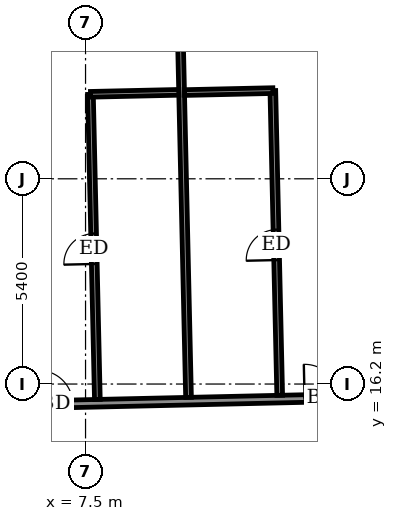
"""IFC4 building model, lengths in metres.
Left out: names, types, materials, properties, quantities, classifications, styles, units other than length and angle.
Written with IfcOpenShell. Run it as: python <this file> out.ifc"""

import sys

from ifc_helpers import new_model, si_unit, direction, frame, frame_2d, origin, place, context, subcontext, project, spatial, rectangle, extrude, element, fill, save


model = new_model("IFC4")
c1 = context("Model", 3, precision=1e-05, world=origin(), true_north=direction((0.0, 1.0)))
c2 = subcontext(c1, "Body", "Model", "MODEL_VIEW")
j1 = project(units=[si_unit("LENGTHUNIT", "METRE"), si_unit("PLANEANGLEUNIT", "RADIAN")], contexts=[c1])
p1 = place(None, origin())
s1 = spatial("IfcSite", under=j1, at=p1, CompositionType="ELEMENT")
p2 = place(p1, origin())
s2 = spatial("IfcBuilding", under=s1, at=p2, CompositionType="ELEMENT")
p3 = place(p2, frame((0.0, 0.0, 279.9)))
s3 = spatial("IfcBuildingStorey", under=s2, at=p3, CompositionType="ELEMENT", Elevation=279.9)
p4 = place(p3, frame((-26.401, 14.918, 0.0), z_axis=(0.0, 0.0, 1.0), x_axis=(0.99974239733, 0.022696673341, 0.0)))
e1 = element("IfcWall", 1, at=p4, inside=s3, PredefinedType="PARTITIONING", context=c2, shape_type="SweptSolid", body=[
    extrude(rectangle(XDim=55.386, YDim=0.2, at=frame_2d((27.693, 0.0))), origin(), (0.0, 0.0, 1.0), 3.05),
])
p5 = place(p4, frame((52.889, 0.0, 0.0)))
e2 = element("IfcOpeningElement", 2, at=p5, cuts=e1, PredefinedType="OPENING", context=c2, shape_type="SweptSolid", body=[
    extrude(rectangle(XDim=1.0, YDim=2.1, at=frame_2d((0.5, 1.05))), frame((0.0, 0.11, 0.0), z_axis=(0.0, -1.0, 0.0), x_axis=(1.0, 0.0, 0.0)), (0.0, 0.0, 1.0), 0.22),
])
p6 = place(p4, frame((48.6, 0.0, 0.0)))
e3 = element("IfcOpeningElement", 3, at=p6, cuts=e1, PredefinedType="OPENING", context=c2, shape_type="SweptSolid", body=[
    extrude(rectangle(XDim=0.9, YDim=2.1, at=frame_2d((0.45, 1.05))), frame((0.0, 0.11, 0.0), z_axis=(0.0, -1.0, 0.0), x_axis=(1.0, 0.0, 0.0)), (0.0, 0.0, 1.0), 0.22),
])
p7 = place(p4, frame((41.8, 0.0, 0.0)))
e4 = element("IfcOpeningElement", 4, at=p7, cuts=e1, PredefinedType="OPENING", context=c2, shape_type="SweptSolid", body=[
    extrude(rectangle(XDim=0.9, YDim=2.1, at=frame_2d((0.45, 1.05))), frame((0.0, 0.11, 0.0), z_axis=(0.0, -1.0, 0.0), x_axis=(1.0, 0.0, 0.0)), (0.0, 0.0, 1.0), 0.22),
])
p8 = place(p4, frame((39.675, 0.0, 0.0)))
e5 = element("IfcOpeningElement", 5, at=p8, cuts=e1, PredefinedType="OPENING", context=c2, shape_type="SweptSolid", body=[
    extrude(rectangle(XDim=0.9, YDim=2.1, at=frame_2d((0.45, 1.05))), frame((0.0, 0.11, 0.0), z_axis=(0.0, -1.0, 0.0), x_axis=(1.0, 0.0, 0.0)), (0.0, 0.0, 1.0), 0.22),
])
p9 = place(p4, frame((32.675, 0.0, 0.0)))
e6 = element("IfcOpeningElement", 6, at=p9, cuts=e1, PredefinedType="OPENING", context=c2, shape_type="SweptSolid", body=[
    extrude(rectangle(XDim=0.9, YDim=2.1, at=frame_2d((0.45, 1.05))), frame((0.0, 0.11, 0.0), z_axis=(0.0, -1.0, 0.0), x_axis=(1.0, 0.0, 0.0)), (0.0, 0.0, 1.0), 0.22),
])
p10 = place(p4, frame((30.4, 0.0, 0.0)))
e7 = element("IfcOpeningElement", 7, at=p10, cuts=e1, PredefinedType="OPENING", context=c2, shape_type="SweptSolid", body=[
    extrude(rectangle(XDim=0.9, YDim=2.1, at=frame_2d((0.45, 1.05))), frame((0.0, 0.11, 0.0), z_axis=(0.0, -1.0, 0.0), x_axis=(1.0, 0.0, 0.0)), (0.0, 0.0, 1.0), 0.22),
])
p11 = place(p4, frame((23.225, 0.0, 0.0)))
e8 = element("IfcOpeningElement", 8, at=p11, cuts=e1, PredefinedType="OPENING", context=c2, shape_type="SweptSolid", body=[
    extrude(rectangle(XDim=0.9, YDim=2.1, at=frame_2d((0.45, 1.05))), frame((0.0, 0.11, 0.0), z_axis=(0.0, -1.0, 0.0), x_axis=(1.0, 0.0, 0.0)), (0.0, 0.0, 1.0), 0.22),
])
p12 = place(p4, frame((20.9, 0.0, 0.0)))
e9 = element("IfcOpeningElement", 9, at=p12, cuts=e1, PredefinedType="OPENING", context=c2, shape_type="SweptSolid", body=[
    extrude(rectangle(XDim=0.9, YDim=2.1, at=frame_2d((0.45, 1.05))), frame((0.0, 0.11, 0.0), z_axis=(0.0, -1.0, 0.0), x_axis=(1.0, 0.0, 0.0)), (0.0, 0.0, 1.0), 0.22),
])
p13 = place(p4, frame((13.9, 0.0, 0.0)))
e10 = element("IfcOpeningElement", 10, at=p13, cuts=e1, PredefinedType="OPENING", context=c2, shape_type="SweptSolid", body=[
    extrude(rectangle(XDim=0.9, YDim=2.1, at=frame_2d((0.45, 1.05))), frame((0.0, 0.11, 0.0), z_axis=(0.0, -1.0, 0.0), x_axis=(1.0, 0.0, 0.0)), (0.0, 0.0, 1.0), 0.22),
])
p14 = place(p4, frame((11.775, 0.0, 0.0)))
e11 = element("IfcOpeningElement", 11, at=p14, cuts=e1, PredefinedType="OPENING", context=c2, shape_type="SweptSolid", body=[
    extrude(rectangle(XDim=0.9, YDim=2.1, at=frame_2d((0.45, 1.05))), frame((0.0, 0.11, 0.0), z_axis=(0.0, -1.0, 0.0), x_axis=(1.0, 0.0, 0.0)), (0.0, 0.0, 1.0), 0.22),
])
p15 = place(p4, frame((1.65, 0.0, 0.0)))
e12 = element("IfcOpeningElement", 12, at=p15, cuts=e1, PredefinedType="OPENING", context=c2, shape_type="SweptSolid", body=[
    extrude(rectangle(XDim=1.0, YDim=2.1, at=frame_2d((0.5, 1.05))), frame((0.0, 0.11, 0.0), z_axis=(0.0, -1.0, 0.0), x_axis=(1.0, 0.0, 0.0)), (0.0, 0.0, 1.0), 0.22),
])
p16 = place(p4, frame((7.025, 0.0, 0.0)))
e13 = element("IfcOpeningElement", 13, at=p16, cuts=e1, PredefinedType="OPENING", context=c2, shape_type="SweptSolid", body=[
    extrude(rectangle(XDim=0.9, YDim=2.1, at=frame_2d((0.45, 1.05))), frame((0.0, 0.11, 0.0), z_axis=(0.0, -1.0, 0.0), x_axis=(1.0, 0.0, 0.0)), (0.0, 0.0, 1.0), 0.22),
])
p17 = place(p3, frame((7.811, 15.795, 0.0), z_axis=(0.0, 0.0, 1.0), x_axis=(-0.022683416553, 0.999742698205, 0.0)))
e14 = element("IfcWall", 14, at=p17, inside=s3, PredefinedType="PARTITIONING", context=c2, shape_type="SweptSolid", body=[
    extrude(rectangle(XDim=8.029, YDim=0.15, at=frame_2d((4.015, 0.0))), origin(), (0.0, 0.0, 1.0), 3.05),
])
p18 = place(p17, frame((3.565, 0.0, 0.0)))
e15 = element("IfcOpeningElement", 15, at=p18, cuts=e14, PredefinedType="OPENING", context=c2, shape_type="SweptSolid", body=[
    extrude(rectangle(XDim=0.8, YDim=2.1, at=frame_2d((0.4, 1.05))), frame((0.0, 0.085, 0.0), z_axis=(0.0, -1.0, 0.0), x_axis=(1.0, 0.0, 0.0)), (0.0, 0.0, 1.0), 0.17),
])
p19 = place(p3, frame((10.21, 15.849, 0.0), z_axis=(0.0, 0.0, 1.0), x_axis=(-0.022661475803, 0.999743195783, 0.0)))
e16 = element("IfcWall", 16, at=p19, inside=s3, PredefinedType="PARTITIONING", context=c2, shape_type="SweptSolid", body=[
    extrude(rectangle(XDim=12.4, YDim=0.15, at=frame_2d((6.2, 0.0))), origin(), (0.0, 0.0, 1.0), 2.5),
])
p20 = place(p3, frame((12.609, 15.903, 0.0), z_axis=(0.0, 0.0, 1.0), x_axis=(-0.022557518047, 0.999745546817, 0.0)))
e17 = element("IfcWall", 17, at=p20, inside=s3, PredefinedType="PARTITIONING", context=c2, shape_type="SweptSolid", body=[
    extrude(rectangle(XDim=8.02, YDim=0.15, at=frame_2d((4.01, 0.0))), origin(), (0.0, 0.0, 1.0), 3.05),
])
p21 = place(p20, frame((3.56, 0.0, 0.0)))
e18 = element("IfcOpeningElement", 18, at=p21, cuts=e17, PredefinedType="OPENING", context=c2, shape_type="SweptSolid", body=[
    extrude(rectangle(XDim=0.8, YDim=2.1, at=frame_2d((0.4, 1.05))), frame((0.0, 0.085, 0.0), z_axis=(0.0, -1.0, 0.0), x_axis=(1.0, 0.0, 0.0)), (0.0, 0.0, 1.0), 0.17),
])
p22 = place(p3, frame((10.105, 23.869, 0.0), z_axis=(0.0, 0.0, 1.0), x_axis=(0.999749954681, 0.022361308448, 0.0)))
e19 = element("IfcWall", 19, at=p22, inside=s3, PredefinedType="PARTITIONING", context=c2, shape_type="SweptSolid", body=[
    extrude(rectangle(XDim=2.325, YDim=0.15, at=frame_2d((1.163, 0.0))), origin(), (0.0, 0.0, 1.0), 3.05),
])
p23 = place(p3, frame((7.631, 23.823, 0.0), z_axis=(0.0, 0.0, 1.0), x_axis=(0.999749744571, 0.022370700241, 0.0)))
e20 = element("IfcWall", 20, at=p23, inside=s3, PredefinedType="PARTITIONING", context=c2, shape_type="SweptSolid", body=[
    extrude(rectangle(XDim=2.324, YDim=0.15, at=frame_2d((1.162, 0.0))), origin(), (0.0, 0.0, 1.0), 3.05),
])
p24 = place(p8, origin())
e21 = element("IfcDoor", 21, at=p24, inside=s3, OperationType="SINGLE_SWING_RIGHT", PredefinedType="DOOR", context=c2, shape_type="SweptSolid", body=[
    extrude(rectangle(XDim=0.9, YDim=2.1, at=frame_2d((0.45, 1.05))), frame((0.0, 0.025, 0.0), z_axis=(0.0, -1.0, 0.0), x_axis=(1.0, 0.0, 0.0)), (0.0, 0.0, 1.0), 0.05),
])
fill(e5, e21)
p25 = place(p21, origin())
e22 = element("IfcDoor", 22, at=p25, inside=s3, OperationType="SINGLE_SWING_RIGHT", PredefinedType="DOOR", context=c2, shape_type="SweptSolid", body=[
    extrude(rectangle(XDim=0.8, YDim=2.1, at=frame_2d((0.4, 1.05))), frame((0.0, 0.025, 0.0), z_axis=(0.0, -1.0, 0.0), x_axis=(1.0, 0.0, 0.0)), (0.0, 0.0, 1.0), 0.05),
])
fill(e18, e22)
p26 = place(p9, origin())
e23 = element("IfcDoor", 23, at=p26, inside=s3, OperationType="SINGLE_SWING_LEFT", PredefinedType="DOOR", context=c2, shape_type="SweptSolid", body=[
    extrude(rectangle(XDim=0.9, YDim=2.1, at=frame_2d((0.45, 1.05))), frame((0.0, 0.025, 0.0), z_axis=(0.0, -1.0, 0.0), x_axis=(1.0, 0.0, 0.0)), (0.0, 0.0, 1.0), 0.05),
])
fill(e6, e23)
p27 = place(p18, origin())
e24 = element("IfcDoor", 24, at=p27, inside=s3, OperationType="SINGLE_SWING_LEFT", PredefinedType="DOOR", context=c2, shape_type="SweptSolid", body=[
    extrude(rectangle(XDim=0.8, YDim=2.1, at=frame_2d((0.4, 1.05))), frame((0.0, 0.025, 0.0), z_axis=(0.0, -1.0, 0.0), x_axis=(1.0, 0.0, 0.0)), (0.0, 0.0, 1.0), 0.05),
])
fill(e15, e24)
save(model, sys.argv[1])
